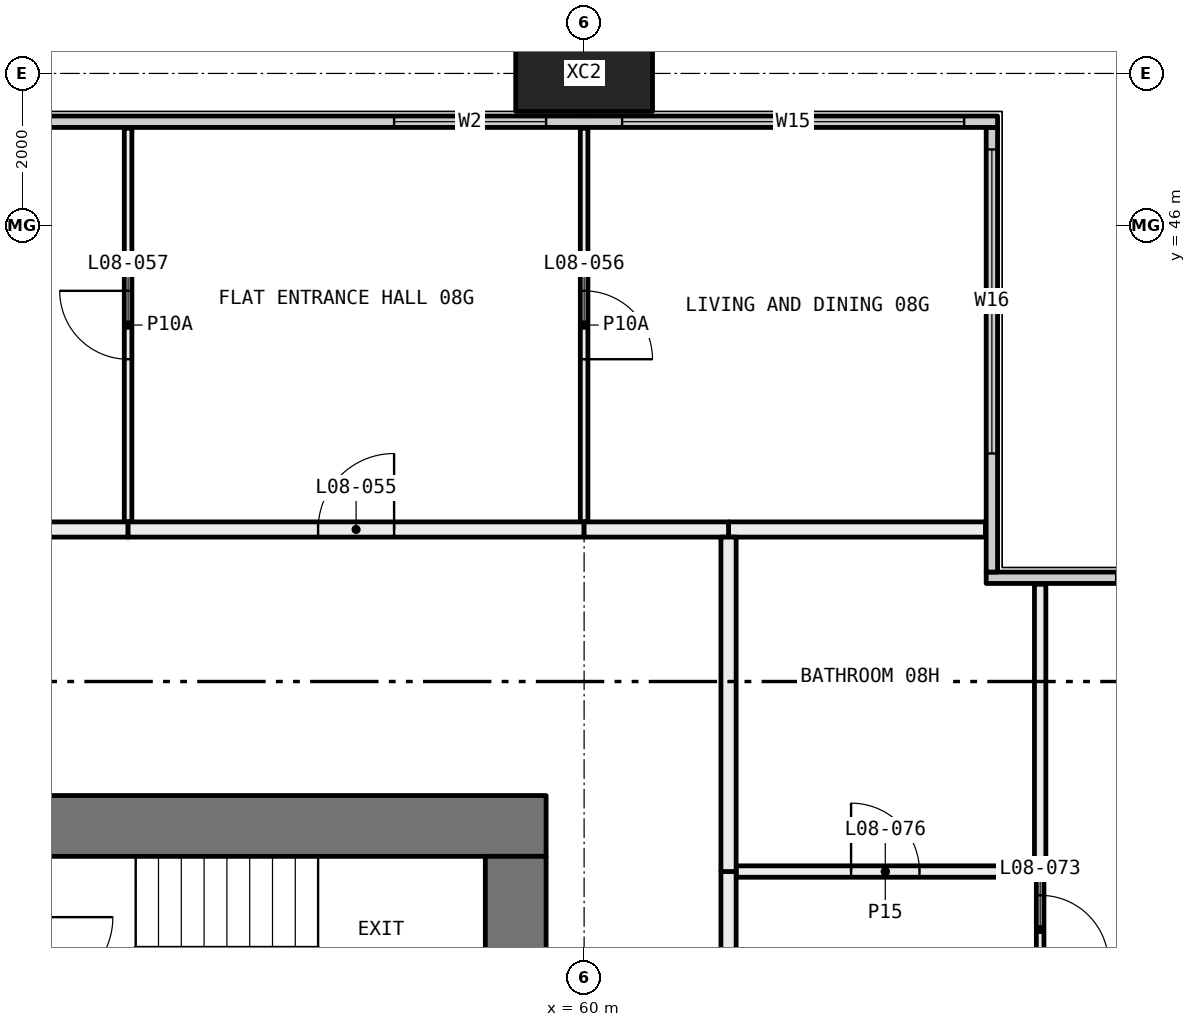
"""IFC4 building model, lengths in metres.
Left out: names, types, materials, properties, quantities, classifications, styles, units other than length and angle.
Written with IfcOpenShell. Run it as: python <this file> out.ifc"""

import sys

from ifc_helpers import new_model, si_unit, direction, frame, frame_2d, origin, origin_2d, place, context, subcontext, project, spatial, rectangle, hollow_rectangle, extrude, element, fill, save


model = new_model("IFC4")
c1 = context("Model", 3, precision=1e-05, world=origin(), true_north=direction((0.0, 1.0)))
c2 = subcontext(c1, "Body", "Model", "MODEL_VIEW")
j1 = project(units=[si_unit("LENGTHUNIT", "METRE"), si_unit("PLANEANGLEUNIT", "RADIAN")], contexts=[c1])
p1 = place(None, origin())
s1 = spatial("IfcSite", under=j1, at=p1, CompositionType="ELEMENT")
p2 = place(p1, origin())
s2 = spatial("IfcBuilding", under=s1, at=p2, CompositionType="ELEMENT")
p3 = place(p2, frame((0.0, 0.0, 40.35)))
s3 = spatial("IfcBuildingStorey", under=s2, at=p3, CompositionType="ELEMENT", Elevation=40.35)
p4 = place(p3, frame((60.0, 48.0, -0.4), z_axis=(0.0, 0.0, 1.0), x_axis=(1.0, 0.0, 0.0)))
e1 = element("IfcColumn", 1, at=p4, inside=s3, PredefinedType="COLUMN", context=c2, shape_type="SweptSolid", body=[
    extrude(hollow_rectangle(XDim=1.8, YDim=1.0, WallThickness=0.07, at=origin_2d()), origin(), (0.0, 0.0, 1.0), 3.45),
])
p5 = place(p3, frame((65.29, 41.365, 0.0), z_axis=(0.0, 0.0, 1.0), x_axis=(1.0, 0.0, 0.0)))
e2 = element("IfcWall", 2, at=p5, inside=s3, PredefinedType="ELEMENTEDWALL", context=c2, shape_type="SweptSolid", body=[
    extrude(rectangle(XDim=6.15, YDim=0.15, at=frame_2d((3.075, 0.0))), origin(), (0.0, 0.0, 1.0), 3.05),
])
p6 = place(p5, frame((1.71, 0.0, 0.45)))
e3 = element("IfcOpeningElement", 3, at=p6, cuts=e2, PredefinedType="OPENING", context=c2, shape_type="SweptSolid", body=[
    extrude(rectangle(XDim=4.0, YDim=2.55, at=frame_2d((2.0, 1.275))), frame((0.0, 0.085, 0.0), z_axis=(0.0, -1.0, 0.0), x_axis=(1.0, 0.0, 0.0)), (0.0, 0.0, 1.0), 0.17),
])
p7 = place(p3, frame((65.365, 41.44, 0.0), z_axis=(0.0, 0.0, 1.0), x_axis=(0.0, 1.0, 0.0)))
e4 = element("IfcWall", 4, at=p7, inside=s3, PredefinedType="ELEMENTEDWALL", context=c2, shape_type="SweptSolid", body=[
    extrude(rectangle(XDim=5.85, YDim=0.15, at=frame_2d((2.925, 0.0))), origin(), (0.0, 0.0, 1.0), 3.05),
])
p8 = place(p7, frame((1.56, 0.0, 0.45)))
e5 = element("IfcOpeningElement", 5, at=p8, cuts=e4, PredefinedType="OPENING", context=c2, shape_type="SweptSolid", body=[
    extrude(rectangle(XDim=4.0, YDim=2.55, at=frame_2d((2.0, 1.275))), frame((0.0, 0.085, 0.0), z_axis=(0.0, -1.0, 0.0), x_axis=(1.0, 0.0, 0.0)), (0.0, 0.0, 1.0), 0.17),
])
p9 = place(p3, frame((6.56, 47.365, 0.0), z_axis=(0.0, 0.0, 1.0), x_axis=(1.0, 0.0, 0.0)))
e6 = element("IfcWall", 6, at=p9, inside=s3, PredefinedType="ELEMENTEDWALL", context=c2, shape_type="SweptSolid", body=[
    extrude(rectangle(XDim=58.88, YDim=0.15, at=frame_2d((29.44, 0.0))), origin(), (0.0, 0.0, 1.0), 3.05),
])
p10 = place(p9, frame((0.44, 0.0, 0.45)))
e7 = element("IfcOpeningElement", 7, at=p10, cuts=e6, PredefinedType="OPENING", context=c2, shape_type="SweptSolid", body=[
    extrude(rectangle(XDim=4.5, YDim=2.55, at=frame_2d((2.25, 1.275))), frame((0.0, 0.085, 0.0), z_axis=(0.0, -1.0, 0.0), x_axis=(1.0, 0.0, 0.0)), (0.0, 0.0, 1.0), 0.17),
])
p11 = place(p9, frame((5.94, 0.0, 0.45)))
e8 = element("IfcOpeningElement", 8, at=p11, cuts=e6, PredefinedType="OPENING", context=c2, shape_type="SweptSolid", body=[
    extrude(rectangle(XDim=3.0, YDim=2.55, at=frame_2d((1.5, 1.275))), frame((0.0, 0.085, 0.0), z_axis=(0.0, -1.0, 0.0), x_axis=(1.0, 0.0, 0.0)), (0.0, 0.0, 1.0), 0.17),
])
p12 = place(p9, frame((13.94, 0.0, 0.45)))
e9 = element("IfcOpeningElement", 9, at=p12, cuts=e6, PredefinedType="OPENING", context=c2, shape_type="SweptSolid", body=[
    extrude(rectangle(XDim=3.0, YDim=2.55, at=frame_2d((1.5, 1.275))), frame((0.0, 0.085, 0.0), z_axis=(0.0, -1.0, 0.0), x_axis=(1.0, 0.0, 0.0)), (0.0, 0.0, 1.0), 0.17),
])
p13 = place(p9, frame((17.94, 0.0, 0.45)))
e10 = element("IfcOpeningElement", 10, at=p13, cuts=e6, PredefinedType="OPENING", context=c2, shape_type="SweptSolid", body=[
    extrude(rectangle(XDim=3.0, YDim=2.55, at=frame_2d((1.5, 1.275))), frame((0.0, 0.085, 0.0), z_axis=(0.0, -1.0, 0.0), x_axis=(1.0, 0.0, 0.0)), (0.0, 0.0, 1.0), 0.17),
])
p14 = place(p9, frame((26.94, 0.0, 0.45)))
e11 = element("IfcOpeningElement", 11, at=p14, cuts=e6, PredefinedType="OPENING", context=c2, shape_type="SweptSolid", body=[
    extrude(rectangle(XDim=2.0, YDim=2.55, at=frame_2d((1.0, 1.275))), frame((0.0, 0.085, 0.0), z_axis=(0.0, -1.0, 0.0), x_axis=(1.0, 0.0, 0.0)), (0.0, 0.0, 1.0), 0.17),
])
p15 = place(p9, frame((29.94, 0.0, 0.45)))
e12 = element("IfcOpeningElement", 12, at=p15, cuts=e6, PredefinedType="OPENING", context=c2, shape_type="SweptSolid", body=[
    extrude(rectangle(XDim=3.0, YDim=2.55, at=frame_2d((1.5, 1.275))), frame((0.0, 0.085, 0.0), z_axis=(0.0, -1.0, 0.0), x_axis=(1.0, 0.0, 0.0)), (0.0, 0.0, 1.0), 0.17),
])
p16 = place(p9, frame((37.94, 0.0, 0.45)))
e13 = element("IfcOpeningElement", 13, at=p16, cuts=e6, PredefinedType="OPENING", context=c2, shape_type="SweptSolid", body=[
    extrude(rectangle(XDim=3.0, YDim=2.55, at=frame_2d((1.5, 1.275))), frame((0.0, 0.085, 0.0), z_axis=(0.0, -1.0, 0.0), x_axis=(1.0, 0.0, 0.0)), (0.0, 0.0, 1.0), 0.17),
])
p17 = place(p9, frame((41.94, 0.0, 0.45)))
e14 = element("IfcOpeningElement", 14, at=p17, cuts=e6, PredefinedType="OPENING", context=c2, shape_type="SweptSolid", body=[
    extrude(rectangle(XDim=3.0, YDim=2.55, at=frame_2d((1.5, 1.275))), frame((0.0, 0.085, 0.0), z_axis=(0.0, -1.0, 0.0), x_axis=(1.0, 0.0, 0.0)), (0.0, 0.0, 1.0), 0.17),
])
p18 = place(p9, frame((50.94, 0.0, 0.45)))
e15 = element("IfcOpeningElement", 15, at=p18, cuts=e6, PredefinedType="OPENING", context=c2, shape_type="SweptSolid", body=[
    extrude(rectangle(XDim=2.0, YDim=2.55, at=frame_2d((1.0, 1.275))), frame((0.0, 0.085, 0.0), z_axis=(0.0, -1.0, 0.0), x_axis=(1.0, 0.0, 0.0)), (0.0, 0.0, 1.0), 0.17),
])
p19 = place(p9, frame((53.94, 0.0, 0.45)))
e16 = element("IfcOpeningElement", 16, at=p19, cuts=e6, PredefinedType="OPENING", context=c2, shape_type="SweptSolid", body=[
    extrude(rectangle(XDim=4.5, YDim=2.55, at=frame_2d((2.25, 1.275))), frame((0.0, 0.085, 0.0), z_axis=(0.0, -1.0, 0.0), x_axis=(1.0, 0.0, 0.0)), (0.0, 0.0, 1.0), 0.17),
])
p20 = place(p3, frame((54.0, 42.1, 0.0), z_axis=(0.0, 0.0, 1.0), x_axis=(0.0, 1.0, 0.0)))
e17 = element("IfcWall", 17, at=p20, inside=s3, PredefinedType="PARTITIONING", context=c2, shape_type="SweptSolid", body=[
    extrude(rectangle(XDim=5.18, YDim=0.1, at=frame_2d((2.59, 0.0))), origin(), (0.0, 0.0, 1.0), 3.05),
])
p21 = place(p20, frame((2.14, 0.0, 0.0)))
e18 = element("IfcOpeningElement", 18, at=p21, cuts=e17, PredefinedType="OPENING", context=c2, shape_type="SweptSolid", body=[
    extrude(rectangle(XDim=0.9, YDim=2.1, at=frame_2d((0.45, 1.05))), frame((0.0, 0.06, 0.0), z_axis=(0.0, -1.0, 0.0), x_axis=(1.0, 0.0, 0.0)), (0.0, 0.0, 1.0), 0.12),
])
p22 = place(p3, frame((48.0, 42.0, 0.0), z_axis=(0.0, 0.0, 1.0), x_axis=(1.0, 0.0, 0.0)))
e19 = element("IfcWall", 19, at=p22, inside=s3, PredefinedType="PARTITIONING", context=c2, shape_type="SweptSolid", body=[
    extrude(rectangle(XDim=6.0, YDim=0.2, at=frame_2d((3.0, 0.0))), origin(), (0.0, 0.0, 1.0), 3.05),
])
p23 = place(p3, frame((60.0, 42.1, 0.0), z_axis=(0.0, 0.0, 1.0), x_axis=(0.0, 1.0, 0.0)))
e20 = element("IfcWall", 20, at=p23, inside=s3, PredefinedType="PARTITIONING", context=c2, shape_type="SweptSolid", body=[
    extrude(rectangle(XDim=5.18, YDim=0.1, at=frame_2d((2.59, 0.0))), origin(), (0.0, 0.0, 1.0), 3.05),
])
p24 = place(p23, frame((2.14, 0.0, 0.0)))
e21 = element("IfcOpeningElement", 21, at=p24, cuts=e20, PredefinedType="OPENING", context=c2, shape_type="SweptSolid", body=[
    extrude(rectangle(XDim=0.9, YDim=2.1, at=frame_2d((0.45, 1.05))), frame((0.0, 0.06, 0.0), z_axis=(0.0, -1.0, 0.0), x_axis=(1.0, 0.0, 0.0)), (0.0, 0.0, 1.0), 0.12),
])
p25 = place(p3, frame((54.0, 42.0, 0.0), z_axis=(0.0, 0.0, 1.0), x_axis=(1.0, 0.0, 0.0)))
e22 = element("IfcWall", 22, at=p25, inside=s3, PredefinedType="PARTITIONING", context=c2, shape_type="SweptSolid", body=[
    extrude(rectangle(XDim=6.0, YDim=0.2, at=frame_2d((3.0, 0.0))), origin(), (0.0, 0.0, 1.0), 3.05),
])
p26 = place(p25, frame((2.5, 0.0, 0.0)))
e23 = element("IfcOpeningElement", 23, at=p26, cuts=e22, PredefinedType="OPENING", context=c2, shape_type="SweptSolid", body=[
    extrude(rectangle(XDim=1.0, YDim=2.1, at=frame_2d((0.5, 1.05))), frame((0.0, 0.11, 0.0), z_axis=(0.0, -1.0, 0.0), x_axis=(1.0, 0.0, 0.0)), (0.0, 0.0, 1.0), 0.22),
])
p27 = place(p3, frame((61.9, 42.0, 0.0), z_axis=(0.0, 0.0, 1.0), x_axis=(1.0, 0.0, 0.0)))
e24 = element("IfcWall", 24, at=p27, inside=s3, PredefinedType="PARTITIONING", context=c2, shape_type="SweptSolid", body=[
    extrude(rectangle(XDim=3.38, YDim=0.2, at=frame_2d((1.69, 0.0))), origin(), (0.0, 0.0, 1.0), 3.05),
])
p28 = place(p3, frame((60.0, 42.0, 0.0), z_axis=(0.0, 0.0, 1.0), x_axis=(1.0, 0.0, 0.0)))
e25 = element("IfcWall", 25, at=p28, inside=s3, PredefinedType="PARTITIONING", context=c2, shape_type="SweptSolid", body=[
    extrude(rectangle(XDim=1.9, YDim=0.2, at=frame_2d((0.95, 0.0))), origin(), (0.0, 0.0, 1.0), 3.05),
])
p29 = place(p3, frame((66.0, 37.425, 0.0), z_axis=(0.0, 0.0, 1.0), x_axis=(0.0, -1.0, 0.0)))
e26 = element("IfcWall", 26, at=p29, inside=s3, PredefinedType="PARTITIONING", context=c2, shape_type="SweptSolid", body=[
    extrude(rectangle(XDim=1.375, YDim=0.1, at=frame_2d((0.688, 0.0))), origin(), (0.0, 0.0, 1.0), 2.45),
])
p30 = place(p29, frame((0.238, 0.0, 0.0)))
e27 = element("IfcOpeningElement", 27, at=p30, cuts=e26, PredefinedType="OPENING", context=c2, shape_type="SweptSolid", body=[
    extrude(rectangle(XDim=0.9, YDim=2.1, at=frame_2d((0.45, 1.05))), frame((0.0, 0.06, 0.0), z_axis=(0.0, -1.0, 0.0), x_axis=(1.0, 0.0, 0.0)), (0.0, 0.0, 1.0), 0.12),
])
p31 = place(p3, frame((66.0, 41.28, 0.0), z_axis=(0.0, 0.0, 1.0), x_axis=(0.0, -1.0, 0.0)))
e28 = element("IfcWall", 28, at=p31, inside=s3, PredefinedType="PARTITIONING", context=c2, shape_type="SweptSolid", body=[
    extrude(rectangle(XDim=3.78, YDim=0.15, at=frame_2d((1.89, 0.0))), origin(), (0.0, 0.0, 1.0), 3.05),
])
p32 = place(p3, frame((65.925, 37.5, 0.0), z_axis=(0.0, 0.0, 1.0), x_axis=(-1.0, 0.0, 0.0)))
e29 = element("IfcWall", 29, at=p32, inside=s3, PredefinedType="PARTITIONING", context=c2, shape_type="SweptSolid", body=[
    extrude(rectangle(XDim=3.925, YDim=0.15, at=frame_2d((1.962, 0.0))), origin(), (0.0, 0.0, 1.0), 3.05),
])
p33 = place(p32, frame((1.512, 0.0, 0.0)))
e30 = element("IfcOpeningElement", 30, at=p33, cuts=e29, PredefinedType="OPENING", context=c2, shape_type="SweptSolid", body=[
    extrude(rectangle(XDim=0.9, YDim=2.1, at=frame_2d((0.45, 1.05))), frame((0.0, 0.085, 0.0), z_axis=(0.0, -1.0, 0.0), x_axis=(1.0, 0.0, 0.0)), (0.0, 0.0, 1.0), 0.17),
])
p34 = place(p3, frame((61.9, 37.5, 0.0), z_axis=(0.0, 0.0, 1.0), x_axis=(0.0, -1.0, 0.0)))
e31 = element("IfcWall", 31, at=p34, inside=s3, PredefinedType="PARTITIONING", context=c2, shape_type="SweptSolid", body=[
    extrude(rectangle(XDim=1.6, YDim=0.2, at=frame_2d((0.8, 0.0))), origin(), (0.0, 0.0, 1.0), 2.45),
])
p35 = place(p3, frame((61.9, 41.9, 0.0), z_axis=(0.0, 0.0, 1.0), x_axis=(0.0, -1.0, 0.0)))
e32 = element("IfcWall", 32, at=p35, inside=s3, PredefinedType="PARTITIONING", context=c2, shape_type="SweptSolid", body=[
    extrude(rectangle(XDim=4.4, YDim=0.2, at=frame_2d((2.2, 0.0))), origin(), (0.0, 0.0, 1.0), 3.05),
])
p36 = place(p3, frame((59.5, 38.1, 0.0), z_axis=(0.0, 0.0, 1.0), x_axis=(-1.0, 0.0, 0.0)))
e33 = element("IfcWall", 33, at=p36, inside=s3, PredefinedType="SHEAR", context=c2, shape_type="SweptSolid", body=[
    extrude(rectangle(XDim=11.0, YDim=0.8, at=frame_2d((5.5, 0.0))), origin(), (0.0, 0.0, 1.0), 3.05),
])
p37 = place(p36, frame((8.4, 0.0, 0.0)))
e34 = element("IfcOpeningElement", 34, at=p37, cuts=e33, PredefinedType="OPENING", context=c2, shape_type="SweptSolid", body=[
    extrude(rectangle(XDim=1.6, YDim=2.1, at=frame_2d((0.8, 1.05))), frame((0.0, 0.41, 0.0), z_axis=(0.0, -1.0, 0.0), x_axis=(1.0, 0.0, 0.0)), (0.0, 0.0, 1.0), 0.82),
])
p38 = place(p3, frame((59.1, 22.3, 0.0), z_axis=(0.0, 0.0, 1.0), x_axis=(0.0, 1.0, 0.0)))
e35 = element("IfcWall", 35, at=p38, inside=s3, PredefinedType="SHEAR", context=c2, shape_type="SweptSolid", body=[
    extrude(rectangle(XDim=15.4, YDim=0.8, at=frame_2d((7.7, 0.0))), origin(), (0.0, 0.0, 1.0), 3.05),
])
p39 = place(p38, frame((8.15, 0.0, 0.0)))
e36 = element("IfcOpeningElement", 36, at=p39, cuts=e35, PredefinedType="OPENING", context=c2, shape_type="SweptSolid", body=[
    extrude(rectangle(XDim=1.6, YDim=2.1, at=frame_2d((0.8, 1.05))), frame((0.0, 0.41, 0.0), z_axis=(0.0, -1.0, 0.0), x_axis=(1.0, 0.0, 0.0)), (0.0, 0.0, 1.0), 0.82),
])
p40 = place(p38, frame((2.05, 0.0, 0.0)))
e37 = element("IfcOpeningElement", 37, at=p40, cuts=e35, PredefinedType="OPENING", context=c2, shape_type="SweptSolid", body=[
    extrude(rectangle(XDim=1.0, YDim=2.1, at=frame_2d((0.5, 1.05))), frame((0.0, 0.41, 0.0), z_axis=(0.0, -1.0, 0.0), x_axis=(1.0, 0.0, 0.0)), (0.0, 0.0, 1.0), 0.82),
])
p41 = place(p8, origin())
e38 = element("IfcWindow", 38, at=p41, inside=s3, PartitioningType="SINGLE_PANEL", PredefinedType="WINDOW", context=c2, shape_type="SweptSolid", body=[
    extrude(rectangle(XDim=4.0, YDim=2.55, at=frame_2d((2.0, 1.275))), frame((0.0, 0.03, 0.0), z_axis=(0.0, -1.0, 0.0), x_axis=(1.0, 0.0, 0.0)), (0.0, 0.0, 1.0), 0.06),
])
fill(e5, e38)
p42 = place(p18, origin())
e39 = element("IfcWindow", 39, at=p42, inside=s3, PartitioningType="SINGLE_PANEL", PredefinedType="WINDOW", context=c2, shape_type="SweptSolid", body=[
    extrude(rectangle(XDim=2.0, YDim=2.55, at=frame_2d((1.0, 1.275))), frame((0.0, 0.03, 0.0), z_axis=(0.0, -1.0, 0.0), x_axis=(1.0, 0.0, 0.0)), (0.0, 0.0, 1.0), 0.06),
])
fill(e15, e39)
p43 = place(p19, origin())
e40 = element("IfcWindow", 40, at=p43, inside=s3, PartitioningType="SINGLE_PANEL", PredefinedType="WINDOW", context=c2, shape_type="SweptSolid", body=[
    extrude(rectangle(XDim=4.5, YDim=2.55, at=frame_2d((2.25, 1.275))), frame((0.0, 0.03, 0.0), z_axis=(0.0, -1.0, 0.0), x_axis=(1.0, 0.0, 0.0)), (0.0, 0.0, 1.0), 0.06),
])
fill(e16, e40)
p44 = place(p26, origin())
e41 = element("IfcDoor", 41, at=p44, inside=s3, OperationType="SINGLE_SWING_LEFT", PredefinedType="DOOR", context=c2, shape_type="SweptSolid", body=[
    extrude(rectangle(XDim=1.0, YDim=2.1, at=frame_2d((0.5, 1.05))), frame((0.0, 0.025, 0.0), z_axis=(0.0, -1.0, 0.0), x_axis=(1.0, 0.0, 0.0)), (0.0, 0.0, 1.0), 0.05),
])
fill(e23, e41)
p45 = place(p24, frame((0.9, 0.0, 0.0), x_axis=(-1.0, 0.0, 0.0)))
e42 = element("IfcDoor", 42, at=p45, inside=s3, OperationType="SINGLE_SWING_LEFT", PredefinedType="DOOR", context=c2, shape_type="SweptSolid", body=[
    extrude(rectangle(XDim=0.9, YDim=2.1, at=frame_2d((0.45, 1.05))), frame((0.0, 0.025, 0.0), z_axis=(0.0, -1.0, 0.0), x_axis=(1.0, 0.0, 0.0)), (0.0, 0.0, 1.0), 0.05),
])
fill(e21, e42)
p46 = place(p21, origin())
e43 = element("IfcDoor", 43, at=p46, inside=s3, OperationType="SINGLE_SWING_LEFT", PredefinedType="DOOR", context=c2, shape_type="SweptSolid", body=[
    extrude(rectangle(XDim=0.9, YDim=2.1, at=frame_2d((0.45, 1.05))), frame((0.0, 0.025, 0.0), z_axis=(0.0, -1.0, 0.0), x_axis=(1.0, 0.0, 0.0)), (0.0, 0.0, 1.0), 0.05),
])
fill(e18, e43)
p47 = place(p30, origin())
e44 = element("IfcDoor", 44, at=p47, inside=s3, OperationType="SINGLE_SWING_LEFT", PredefinedType="DOOR", context=c2, shape_type="SweptSolid", body=[
    extrude(rectangle(XDim=0.9, YDim=2.1, at=frame_2d((0.45, 1.05))), frame((0.0, 0.025, 0.0), z_axis=(0.0, -1.0, 0.0), x_axis=(1.0, 0.0, 0.0)), (0.0, 0.0, 1.0), 0.05),
])
fill(e27, e44)
p48 = place(p33, frame((0.9, 0.0, 0.0), x_axis=(-1.0, 0.0, 0.0)))
e45 = element("IfcDoor", 45, at=p48, inside=s3, OperationType="SINGLE_SWING_RIGHT", PredefinedType="DOOR", context=c2, shape_type="SweptSolid", body=[
    extrude(rectangle(XDim=0.9, YDim=2.1, at=frame_2d((0.45, 1.05))), frame((0.0, 0.025, 0.0), z_axis=(0.0, -1.0, 0.0), x_axis=(1.0, 0.0, 0.0)), (0.0, 0.0, 1.0), 0.05),
])
fill(e30, e45)
save(model, sys.argv[1])
